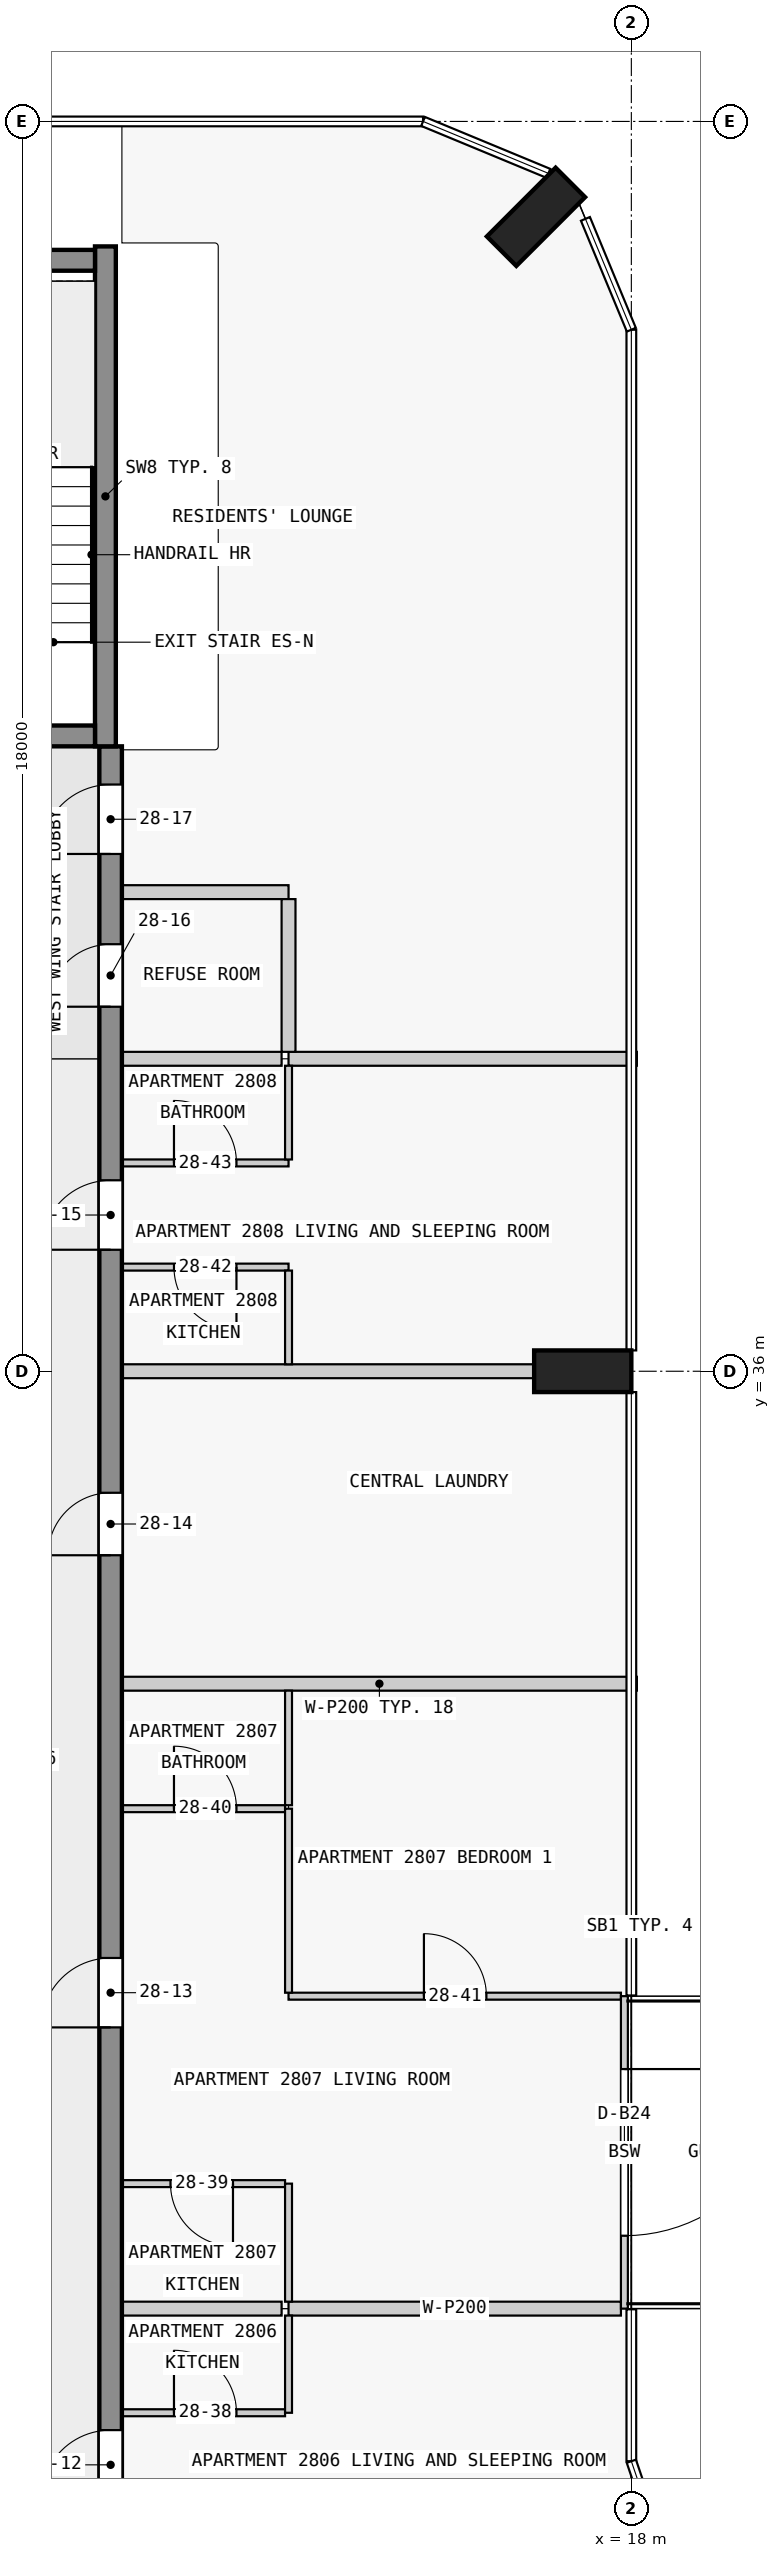
"""IFC4 building model, lengths in metres.
Left out: names, types, materials, properties, quantities, classifications, styles, units other than length and angle.
Written with IfcOpenShell. Run it as: python <this file> out.ifc"""

import sys

from ifc_helpers import new_model, si_unit, direction, frame, frame_2d, origin, origin_2d, place, context, subcontext, project, spatial, rectangle, extrude, element, fill, save


model = new_model("IFC4")
c1 = context("Model", 3, precision=1e-05, world=origin(), true_north=direction((0.0, 1.0)))
c2 = subcontext(c1, "Body", "Model", "MODEL_VIEW")
j1 = project(units=[si_unit("LENGTHUNIT", "METRE"), si_unit("PLANEANGLEUNIT", "RADIAN")], contexts=[c1])
p1 = place(None, origin())
s1 = spatial("IfcSite", under=j1, at=p1, CompositionType="ELEMENT")
p2 = place(p1, origin())
s2 = spatial("IfcBuilding", under=s1, at=p2, CompositionType="ELEMENT")
p3 = place(p2, frame((0.0, 0.0, 109.8)))
s3 = spatial("IfcBuildingStorey", under=s2, at=p3, CompositionType="ELEMENT", Elevation=109.8)
for number, where, z_axis, x_axis in (
    (1, (17.3, 36.0, 0.0), (0.0, 0.0, 1.0), (0.0, 1.0, 0.0)),
    (2, (16.626, 52.626, 0.0), (0.0, 0.0, 1.0), (-0.707, 0.707, 0.0)),
):
    element("IfcColumn", number, at=place(p3, frame(where, z_axis=z_axis, x_axis=x_axis)), inside=s3, PredefinedType="COLUMN", context=c2, shape_type="SweptSolid", body=[
        extrude(rectangle(XDim=0.6, YDim=1.4, at=origin_2d()), origin(), (0.0, 0.0, 1.0), 3.5),
    ])
p4 = place(p3, frame((7.725, 45.15, 0.0), z_axis=(0.0, 0.0, 1.0), x_axis=(1.0, 0.0, 0.0)))
e3 = element("IfcWall", 3, at=p4, inside=s3, PredefinedType="SHEAR", context=c2, shape_type="SweptSolid", body=[
    extrude(rectangle(XDim=2.55, YDim=0.3, at=frame_2d((1.275, 0.0))), origin(), (0.0, 0.0, 1.0), 3.5),
])
p5 = place(p4, frame((0.725, 0.0, 0.0)))
e4 = element("IfcOpeningElement", 4, at=p5, cuts=e3, PredefinedType="OPENING", context=c2, shape_type="SweptSolid", body=[
    extrude(rectangle(XDim=1.1, YDim=2.1, at=frame_2d((0.55, 1.05))), frame((0.0, 0.16, 0.0), z_axis=(0.0, -1.0, 0.0), x_axis=(1.0, 0.0, 0.0)), (0.0, 0.0, 1.0), 0.32),
])
p6 = place(p3, frame((7.725, 52.0, 0.0), z_axis=(0.0, 0.0, 1.0), x_axis=(1.0, 0.0, 0.0)))
e5 = element("IfcWall", 5, at=p6, inside=s3, PredefinedType="SHEAR", context=c2, shape_type="SweptSolid", body=[
    extrude(rectangle(XDim=2.55, YDim=0.3, at=frame_2d((1.275, 0.0))), origin(), (0.0, 0.0, 1.0), 3.5),
])
p7 = place(p3, frame((10.425, 45.0, 0.0), z_axis=(0.0, 0.0, 1.0), x_axis=(0.0, 1.0, 0.0)))
e6 = element("IfcWall", 6, at=p7, inside=s3, PredefinedType="SHEAR", context=c2, shape_type="SweptSolid", body=[
    extrude(rectangle(XDim=7.2, YDim=0.3, at=frame_2d((3.6, 0.0))), origin(), (0.0, 0.0, 1.0), 3.5),
])
p8 = place(p3, frame((10.5, 18.0, 0.0), z_axis=(0.0, 0.0, 1.0), x_axis=(0.0, 1.0, 0.0)))
e7 = element("IfcWall", 7, at=p8, inside=s3, PredefinedType="SHEAR", context=c2, shape_type="SweptSolid", body=[
    extrude(rectangle(XDim=27.0, YDim=0.325, at=frame_2d((13.5, 0.0))), origin(), (0.0, 0.0, 1.0), 3.25),
])
p9 = place(p8, frame((1.75, 0.0, 0.0)))
e8 = element("IfcOpeningElement", 8, at=p9, cuts=e7, PredefinedType="OPENING", context=c2, shape_type="SweptSolid", body=[
    extrude(rectangle(XDim=1.0, YDim=2.1, at=frame_2d((0.5, 1.05))), frame((0.0, 0.172, 0.0), z_axis=(0.0, -1.0, 0.0), x_axis=(1.0, 0.0, 0.0)), (0.0, 0.0, 1.0), 0.345),
])
p10 = place(p8, frame((8.55, 0.0, 0.0)))
e9 = element("IfcOpeningElement", 9, at=p10, cuts=e7, PredefinedType="OPENING", context=c2, shape_type="SweptSolid", body=[
    extrude(rectangle(XDim=1.0, YDim=2.1, at=frame_2d((0.5, 1.05))), frame((0.0, 0.172, 0.0), z_axis=(0.0, -1.0, 0.0), x_axis=(1.0, 0.0, 0.0)), (0.0, 0.0, 1.0), 0.345),
])
p11 = place(p8, frame((15.35, 0.0, 0.0)))
e10 = element("IfcOpeningElement", 10, at=p11, cuts=e7, PredefinedType="OPENING", context=c2, shape_type="SweptSolid", body=[
    extrude(rectangle(XDim=0.9, YDim=2.1, at=frame_2d((0.45, 1.05))), frame((0.0, 0.172, 0.0), z_axis=(0.0, -1.0, 0.0), x_axis=(1.0, 0.0, 0.0)), (0.0, 0.0, 1.0), 0.345),
])
p12 = place(p8, frame((19.75, 0.0, 0.0)))
e11 = element("IfcOpeningElement", 11, at=p12, cuts=e7, PredefinedType="OPENING", context=c2, shape_type="SweptSolid", body=[
    extrude(rectangle(XDim=1.0, YDim=2.1, at=frame_2d((0.5, 1.05))), frame((0.0, 0.172, 0.0), z_axis=(0.0, -1.0, 0.0), x_axis=(1.0, 0.0, 0.0)), (0.0, 0.0, 1.0), 0.345),
])
p13 = place(p8, frame((23.25, 0.0, 0.0)))
e12 = element("IfcOpeningElement", 12, at=p13, cuts=e7, PredefinedType="OPENING", context=c2, shape_type="SweptSolid", body=[
    extrude(rectangle(XDim=0.9, YDim=2.1, at=frame_2d((0.45, 1.05))), frame((0.0, 0.172, 0.0), z_axis=(0.0, -1.0, 0.0), x_axis=(1.0, 0.0, 0.0)), (0.0, 0.0, 1.0), 0.345),
])
p14 = place(p8, frame((25.45, 0.0, 0.0)))
e13 = element("IfcOpeningElement", 13, at=p14, cuts=e7, PredefinedType="OPENING", context=c2, shape_type="SweptSolid", body=[
    extrude(rectangle(XDim=1.0, YDim=2.1, at=frame_2d((0.5, 1.05))), frame((0.0, 0.172, 0.0), z_axis=(0.0, -1.0, 0.0), x_axis=(1.0, 0.0, 0.0)), (0.0, 0.0, 1.0), 0.345),
])
p15 = place(p3, frame((17.9, 27.0, 0.0), z_axis=(0.0, 0.0, 1.0), x_axis=(0.0, -1.0, 0.0)))
e14 = element("IfcWall", 14, at=p15, inside=s3, PredefinedType="STANDARD", context=c2, shape_type="SweptSolid", body=[
    extrude(rectangle(XDim=4.5, YDim=0.1, at=frame_2d((2.25, 0.0))), origin(), (0.0, 0.0, 1.0), 3.25),
])
p16 = place(p15, frame((1.05, 0.0, 0.0)))
e15 = element("IfcOpeningElement", 15, at=p16, cuts=e14, PredefinedType="OPENING", context=c2, shape_type="SweptSolid", body=[
    extrude(rectangle(XDim=2.4, YDim=2.4, at=frame_2d((1.2, 1.2))), frame((0.0, 0.06, 0.0), z_axis=(0.0, -1.0, 0.0), x_axis=(1.0, 0.0, 0.0)), (0.0, 0.0, 1.0), 0.12),
])
p17 = place(p3, frame((10.663, 21.0, 0.0), z_axis=(0.0, 0.0, 1.0), x_axis=(1.0, 0.0, 0.0)))
e16 = element("IfcWall", 16, at=p17, inside=s3, PredefinedType="PARTITIONING", context=c2, shape_type="SweptSolid", body=[
    extrude(rectangle(XDim=2.35, YDim=0.1, at=frame_2d((1.175, 0.0))), origin(), (0.0, 0.0, 1.0), 3.25),
])
p18 = place(p17, frame((0.75, 0.0, 0.0)))
e17 = element("IfcOpeningElement", 17, at=p18, cuts=e16, PredefinedType="OPENING", context=c2, shape_type="SweptSolid", body=[
    extrude(rectangle(XDim=0.9, YDim=2.1, at=frame_2d((0.45, 1.05))), frame((0.0, 0.06, 0.0), z_axis=(0.0, -1.0, 0.0), x_axis=(1.0, 0.0, 0.0)), (0.0, 0.0, 1.0), 0.12),
])
p19 = place(p3, frame((12.962, 22.5, 0.0), z_axis=(0.0, 0.0, 1.0), x_axis=(-1.0, 0.0, 0.0)))
e18 = element("IfcWall", 18, at=p19, inside=s3, PredefinedType="PARTITIONING", context=c2, shape_type="SweptSolid", body=[
    extrude(rectangle(XDim=2.3, YDim=0.2, at=frame_2d((1.15, 0.0))), origin(), (0.0, 0.0, 1.0), 3.25),
])
p20 = place(p3, frame((13.062, 22.5, 0.0), z_axis=(0.0, 0.0, 1.0), x_axis=(1.0, 0.0, 0.0)))
e19 = element("IfcWall", 19, at=p20, inside=s3, PredefinedType="PARTITIONING", context=c2, shape_type="SweptSolid", body=[
    extrude(rectangle(XDim=4.788, YDim=0.2, at=frame_2d((2.394, 0.0))), origin(), (0.0, 0.0, 1.0), 3.25),
])
p21 = place(p3, frame((13.012, 24.3, 0.0), z_axis=(0.0, 0.0, 1.0), x_axis=(-1.0, 0.0, 0.0)))
e20 = element("IfcWall", 20, at=p21, inside=s3, PredefinedType="PARTITIONING", context=c2, shape_type="SweptSolid", body=[
    extrude(rectangle(XDim=2.35, YDim=0.1, at=frame_2d((1.175, 0.0))), origin(), (0.0, 0.0, 1.0), 3.25),
])
p22 = place(p21, frame((0.75, 0.0, 0.0)))
e21 = element("IfcOpeningElement", 21, at=p22, cuts=e20, PredefinedType="OPENING", context=c2, shape_type="SweptSolid", body=[
    extrude(rectangle(XDim=0.9, YDim=2.1, at=frame_2d((0.45, 1.05))), frame((0.0, 0.06, 0.0), z_axis=(0.0, -1.0, 0.0), x_axis=(1.0, 0.0, 0.0)), (0.0, 0.0, 1.0), 0.12),
])
p23 = place(p3, frame((13.062, 27.0, 0.0), z_axis=(0.0, 0.0, 1.0), x_axis=(1.0, 0.0, 0.0)))
e22 = element("IfcWall", 22, at=p23, inside=s3, PredefinedType="PARTITIONING", context=c2, shape_type="SweptSolid", body=[
    extrude(rectangle(XDim=4.788, YDim=0.1, at=frame_2d((2.394, 0.0))), origin(), (0.0, 0.0, 1.0), 3.25),
])
p24 = place(p23, frame((1.95, 0.0, 0.0)))
e23 = element("IfcOpeningElement", 23, at=p24, cuts=e22, PredefinedType="OPENING", context=c2, shape_type="SweptSolid", body=[
    extrude(rectangle(XDim=0.9, YDim=2.1, at=frame_2d((0.45, 1.05))), frame((0.0, 0.06, 0.0), z_axis=(0.0, -1.0, 0.0), x_axis=(1.0, 0.0, 0.0)), (0.0, 0.0, 1.0), 0.12),
])
p25 = place(p3, frame((10.663, 29.7, 0.0), z_axis=(0.0, 0.0, 1.0), x_axis=(1.0, 0.0, 0.0)))
e24 = element("IfcWall", 24, at=p25, inside=s3, PredefinedType="PARTITIONING", context=c2, shape_type="SweptSolid", body=[
    extrude(rectangle(XDim=2.35, YDim=0.1, at=frame_2d((1.175, 0.0))), origin(), (0.0, 0.0, 1.0), 3.25),
])
p26 = place(p25, frame((0.75, 0.0, 0.0)))
e25 = element("IfcOpeningElement", 25, at=p26, cuts=e24, PredefinedType="OPENING", context=c2, shape_type="SweptSolid", body=[
    extrude(rectangle(XDim=0.9, YDim=2.1, at=frame_2d((0.45, 1.05))), frame((0.0, 0.06, 0.0), z_axis=(0.0, -1.0, 0.0), x_axis=(1.0, 0.0, 0.0)), (0.0, 0.0, 1.0), 0.12),
])
p27 = place(p3, frame((18.08, 31.5, 0.0), z_axis=(0.0, 0.0, 1.0), x_axis=(-1.0, 0.0, 0.0)))
e26 = element("IfcWall", 26, at=p27, inside=s3, PredefinedType="PARTITIONING", context=c2, shape_type="SweptSolid", body=[
    extrude(rectangle(XDim=7.417, YDim=0.2, at=frame_2d((3.709, 0.0))), origin(), (0.0, 0.0, 1.0), 3.25),
])
p28 = place(p3, frame((16.6, 36.0, 0.0), z_axis=(0.0, 0.0, 1.0), x_axis=(-1.0, 0.0, 0.0)))
e27 = element("IfcWall", 27, at=p28, inside=s3, PredefinedType="PARTITIONING", context=c2, shape_type="SweptSolid", body=[
    extrude(rectangle(XDim=5.938, YDim=0.2, at=frame_2d((2.969, 0.0))), origin(), (0.0, 0.0, 1.0), 3.25),
])
p29 = place(p3, frame((13.062, 37.5, 0.0), z_axis=(0.0, 0.0, 1.0), x_axis=(-1.0, 0.0, 0.0)))
e28 = element("IfcWall", 28, at=p29, inside=s3, PredefinedType="PARTITIONING", context=c2, shape_type="SweptSolid", body=[
    extrude(rectangle(XDim=2.4, YDim=0.1, at=frame_2d((1.2, 0.0))), origin(), (0.0, 0.0, 1.0), 3.25),
])
p30 = place(p29, frame((0.75, 0.0, 0.0)))
e29 = element("IfcOpeningElement", 29, at=p30, cuts=e28, PredefinedType="OPENING", context=c2, shape_type="SweptSolid", body=[
    extrude(rectangle(XDim=0.9, YDim=2.1, at=frame_2d((0.45, 1.05))), frame((0.0, 0.06, 0.0), z_axis=(0.0, -1.0, 0.0), x_axis=(1.0, 0.0, 0.0)), (0.0, 0.0, 1.0), 0.12),
])
p31 = place(p3, frame((10.663, 39.0, 0.0), z_axis=(0.0, 0.0, 1.0), x_axis=(1.0, 0.0, 0.0)))
e30 = element("IfcWall", 30, at=p31, inside=s3, PredefinedType="PARTITIONING", context=c2, shape_type="SweptSolid", body=[
    extrude(rectangle(XDim=2.4, YDim=0.1, at=frame_2d((1.2, 0.0))), origin(), (0.0, 0.0, 1.0), 3.25),
])
p32 = place(p31, frame((0.75, 0.0, 0.0)))
e31 = element("IfcOpeningElement", 31, at=p32, cuts=e30, PredefinedType="OPENING", context=c2, shape_type="SweptSolid", body=[
    extrude(rectangle(XDim=0.9, YDim=2.1, at=frame_2d((0.45, 1.05))), frame((0.0, 0.06, 0.0), z_axis=(0.0, -1.0, 0.0), x_axis=(1.0, 0.0, 0.0)), (0.0, 0.0, 1.0), 0.12),
])
p33 = place(p3, frame((12.962, 40.5, 0.0), z_axis=(0.0, 0.0, 1.0), x_axis=(-1.0, 0.0, 0.0)))
e32 = element("IfcWall", 32, at=p33, inside=s3, PredefinedType="PARTITIONING", context=c2, shape_type="SweptSolid", body=[
    extrude(rectangle(XDim=2.3, YDim=0.2, at=frame_2d((1.15, 0.0))), origin(), (0.0, 0.0, 1.0), 3.25),
])
p34 = place(p3, frame((13.062, 40.5, 0.0), z_axis=(0.0, 0.0, 1.0), x_axis=(1.0, 0.0, 0.0)))
e33 = element("IfcWall", 33, at=p34, inside=s3, PredefinedType="PARTITIONING", context=c2, shape_type="SweptSolid", body=[
    extrude(rectangle(XDim=5.018, YDim=0.2, at=frame_2d((2.509, 0.0))), origin(), (0.0, 0.0, 1.0), 3.25),
])
p35 = place(p3, frame((13.062, 42.9, 0.0), z_axis=(0.0, 0.0, 1.0), x_axis=(-1.0, 0.0, 0.0)))
e34 = element("IfcWall", 34, at=p35, inside=s3, PredefinedType="PARTITIONING", context=c2, shape_type="SweptSolid", body=[
    extrude(rectangle(XDim=2.4, YDim=0.2, at=frame_2d((1.2, 0.0))), origin(), (0.0, 0.0, 1.0), 3.25),
])
p36 = place(p3, frame((13.062, 29.7, 0.0), z_axis=(0.0, 0.0, 1.0), x_axis=(0.0, -1.0, 0.0)))
e35 = element("IfcWall", 35, at=p36, inside=s3, PredefinedType="PARTITIONING", context=c2, shape_type="SweptSolid", body=[
    extrude(rectangle(XDim=2.65, YDim=0.1, at=frame_2d((1.325, 0.0))), origin(), (0.0, 0.0, 1.0), 3.25),
])
p37 = place(p3, frame((13.062, 21.0, 0.0), z_axis=(0.0, 0.0, 1.0), x_axis=(0.0, 1.0, 0.0)))
e36 = element("IfcWall", 36, at=p37, inside=s3, PredefinedType="PARTITIONING", context=c2, shape_type="SweptSolid", body=[
    extrude(rectangle(XDim=1.4, YDim=0.1, at=frame_2d((0.7, 0.0))), origin(), (0.0, 0.0, 1.0), 3.25),
])
p38 = place(p3, frame((13.062, 22.6, 0.0), z_axis=(0.0, 0.0, 1.0), x_axis=(0.0, 1.0, 0.0)))
e37 = element("IfcWall", 37, at=p38, inside=s3, PredefinedType="PARTITIONING", context=c2, shape_type="SweptSolid", body=[
    extrude(rectangle(XDim=1.7, YDim=0.1, at=frame_2d((0.85, 0.0))), origin(), (0.0, 0.0, 1.0), 3.25),
])
p39 = place(p3, frame((13.062, 29.75, 0.0), z_axis=(0.0, 0.0, 1.0), x_axis=(0.0, 1.0, 0.0)))
e38 = element("IfcWall", 38, at=p39, inside=s3, PredefinedType="PARTITIONING", context=c2, shape_type="SweptSolid", body=[
    extrude(rectangle(XDim=1.65, YDim=0.1, at=frame_2d((0.825, 0.0))), origin(), (0.0, 0.0, 1.0), 3.25),
])
for number, where, z_axis, x_axis in (
    (39, (13.062, 36.1, 0.0), (0.0, 0.0, 1.0), (0.0, 1.0, 0.0)),
    (40, (13.062, 39.05, 0.0), (0.0, 0.0, 1.0), (0.0, 1.0, 0.0)),
):
    element("IfcWall", number, at=place(p3, frame(where, z_axis=z_axis, x_axis=x_axis)), inside=s3, PredefinedType="PARTITIONING", context=c2, shape_type="SweptSolid", body=[
        extrude(rectangle(XDim=1.35, YDim=0.1, at=frame_2d((0.675, 0.0))), origin(), (0.0, 0.0, 1.0), 3.25),
    ])
p40 = place(p3, frame((13.062, 40.6, 0.0), z_axis=(0.0, 0.0, 1.0), x_axis=(0.0, 1.0, 0.0)))
e41 = element("IfcWall", 41, at=p40, inside=s3, PredefinedType="PARTITIONING", context=c2, shape_type="SweptSolid", body=[
    extrude(rectangle(XDim=2.2, YDim=0.2, at=frame_2d((1.1, 0.0))), origin(), (0.0, 0.0, 1.0), 3.25),
])
p41 = place(p16, origin())
e42 = element("IfcDoor", 42, at=p41, inside=s3, OperationType="SINGLE_SWING_LEFT", PredefinedType="DOOR", context=c2, shape_type="SweptSolid", body=[
    extrude(rectangle(XDim=2.4, YDim=2.4, at=frame_2d((1.2, 1.2))), frame((0.0, 0.025, 0.0), z_axis=(0.0, -1.0, 0.0), x_axis=(1.0, 0.0, 0.0)), (0.0, 0.0, 1.0), 0.05),
])
fill(e15, e42)
p42 = place(p9, origin())
e43 = element("IfcDoor", 43, at=p42, inside=s3, OperationType="SINGLE_SWING_LEFT", PredefinedType="DOOR", context=c2, shape_type="SweptSolid", body=[
    extrude(rectangle(XDim=1.0, YDim=2.1, at=frame_2d((0.5, 1.05))), frame((0.0, 0.025, 0.0), z_axis=(0.0, -1.0, 0.0), x_axis=(1.0, 0.0, 0.0)), (0.0, 0.0, 1.0), 0.05),
])
fill(e8, e43)
p43 = place(p10, origin())
e44 = element("IfcDoor", 44, at=p43, inside=s3, OperationType="SINGLE_SWING_LEFT", PredefinedType="DOOR", context=c2, shape_type="SweptSolid", body=[
    extrude(rectangle(XDim=1.0, YDim=2.1, at=frame_2d((0.5, 1.05))), frame((0.0, 0.025, 0.0), z_axis=(0.0, -1.0, 0.0), x_axis=(1.0, 0.0, 0.0)), (0.0, 0.0, 1.0), 0.05),
])
fill(e9, e44)
p44 = place(p11, origin())
e45 = element("IfcDoor", 45, at=p44, inside=s3, OperationType="SINGLE_SWING_RIGHT", PredefinedType="DOOR", context=c2, shape_type="SweptSolid", body=[
    extrude(rectangle(XDim=0.9, YDim=2.1, at=frame_2d((0.45, 1.05))), frame((0.0, 0.025, 0.0), z_axis=(0.0, -1.0, 0.0), x_axis=(1.0, 0.0, 0.0)), (0.0, 0.0, 1.0), 0.05),
])
fill(e10, e45)
p45 = place(p12, origin())
e46 = element("IfcDoor", 46, at=p45, inside=s3, OperationType="SINGLE_SWING_RIGHT", PredefinedType="DOOR", context=c2, shape_type="SweptSolid", body=[
    extrude(rectangle(XDim=1.0, YDim=2.1, at=frame_2d((0.5, 1.05))), frame((0.0, 0.025, 0.0), z_axis=(0.0, -1.0, 0.0), x_axis=(1.0, 0.0, 0.0)), (0.0, 0.0, 1.0), 0.05),
])
fill(e11, e46)
p46 = place(p13, origin())
e47 = element("IfcDoor", 47, at=p46, inside=s3, OperationType="SINGLE_SWING_RIGHT", PredefinedType="DOOR", context=c2, shape_type="SweptSolid", body=[
    extrude(rectangle(XDim=0.9, YDim=2.1, at=frame_2d((0.45, 1.05))), frame((0.0, 0.025, 0.0), z_axis=(0.0, -1.0, 0.0), x_axis=(1.0, 0.0, 0.0)), (0.0, 0.0, 1.0), 0.05),
])
fill(e12, e47)
p47 = place(p14, origin())
e48 = element("IfcDoor", 48, at=p47, inside=s3, OperationType="SINGLE_SWING_RIGHT", PredefinedType="DOOR", context=c2, shape_type="SweptSolid", body=[
    extrude(rectangle(XDim=1.0, YDim=2.1, at=frame_2d((0.5, 1.05))), frame((0.0, 0.025, 0.0), z_axis=(0.0, -1.0, 0.0), x_axis=(1.0, 0.0, 0.0)), (0.0, 0.0, 1.0), 0.05),
])
fill(e13, e48)
p48 = place(p18, origin())
e49 = element("IfcDoor", 49, at=p48, inside=s3, OperationType="SINGLE_SWING_RIGHT", PredefinedType="DOOR", context=c2, shape_type="SweptSolid", body=[
    extrude(rectangle(XDim=0.9, YDim=2.1, at=frame_2d((0.45, 1.05))), frame((0.0, 0.025, 0.0), z_axis=(0.0, -1.0, 0.0), x_axis=(1.0, 0.0, 0.0)), (0.0, 0.0, 1.0), 0.05),
])
fill(e17, e49)
p49 = place(p22, origin())
e50 = element("IfcDoor", 50, at=p49, inside=s3, OperationType="SINGLE_SWING_RIGHT", PredefinedType="DOOR", context=c2, shape_type="SweptSolid", body=[
    extrude(rectangle(XDim=0.9, YDim=2.1, at=frame_2d((0.45, 1.05))), frame((0.0, 0.025, 0.0), z_axis=(0.0, -1.0, 0.0), x_axis=(1.0, 0.0, 0.0)), (0.0, 0.0, 1.0), 0.05),
])
fill(e21, e50)
p50 = place(p26, origin())
e51 = element("IfcDoor", 51, at=p50, inside=s3, OperationType="SINGLE_SWING_RIGHT", PredefinedType="DOOR", context=c2, shape_type="SweptSolid", body=[
    extrude(rectangle(XDim=0.9, YDim=2.1, at=frame_2d((0.45, 1.05))), frame((0.0, 0.025, 0.0), z_axis=(0.0, -1.0, 0.0), x_axis=(1.0, 0.0, 0.0)), (0.0, 0.0, 1.0), 0.05),
])
fill(e25, e51)
p51 = place(p24, origin())
e52 = element("IfcDoor", 52, at=p51, inside=s3, OperationType="SINGLE_SWING_RIGHT", PredefinedType="DOOR", context=c2, shape_type="SweptSolid", body=[
    extrude(rectangle(XDim=0.9, YDim=2.1, at=frame_2d((0.45, 1.05))), frame((0.0, 0.025, 0.0), z_axis=(0.0, -1.0, 0.0), x_axis=(1.0, 0.0, 0.0)), (0.0, 0.0, 1.0), 0.05),
])
fill(e23, e52)
p52 = place(p30, origin())
e53 = element("IfcDoor", 53, at=p52, inside=s3, OperationType="SINGLE_SWING_LEFT", PredefinedType="DOOR", context=c2, shape_type="SweptSolid", body=[
    extrude(rectangle(XDim=0.9, YDim=2.1, at=frame_2d((0.45, 1.05))), frame((0.0, 0.025, 0.0), z_axis=(0.0, -1.0, 0.0), x_axis=(1.0, 0.0, 0.0)), (0.0, 0.0, 1.0), 0.05),
])
fill(e29, e53)
p53 = place(p32, origin())
e54 = element("IfcDoor", 54, at=p53, inside=s3, OperationType="SINGLE_SWING_LEFT", PredefinedType="DOOR", context=c2, shape_type="SweptSolid", body=[
    extrude(rectangle(XDim=0.9, YDim=2.1, at=frame_2d((0.45, 1.05))), frame((0.0, 0.025, 0.0), z_axis=(0.0, -1.0, 0.0), x_axis=(1.0, 0.0, 0.0)), (0.0, 0.0, 1.0), 0.05),
])
fill(e31, e54)
save(model, sys.argv[1])
